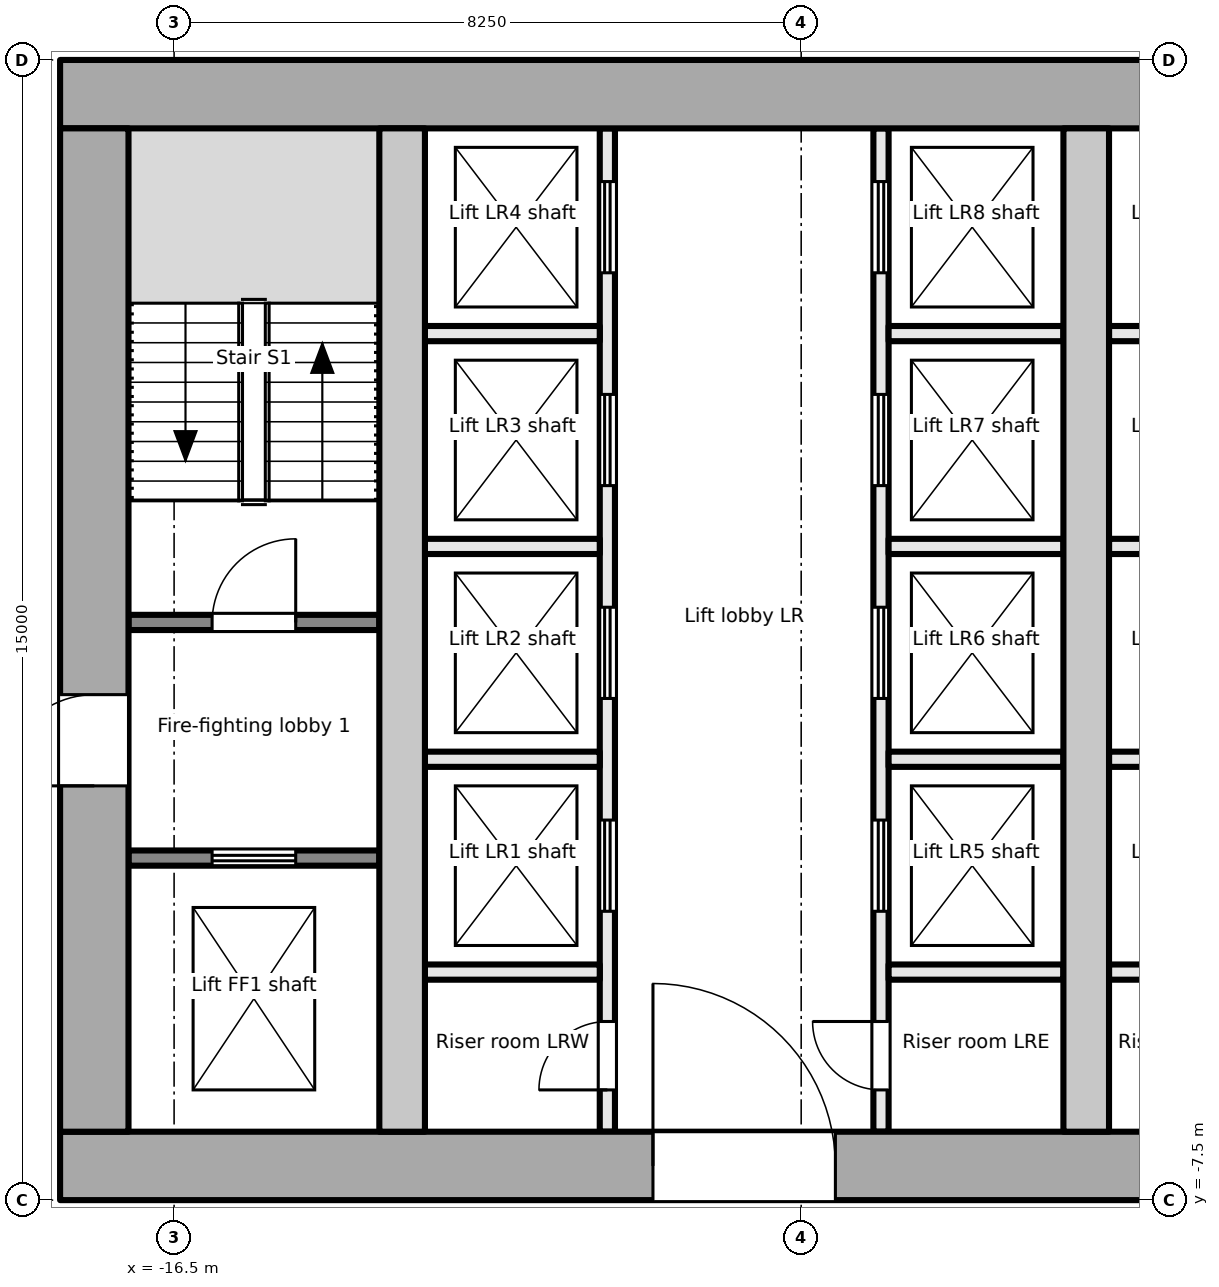
"""IFC4 building model, lengths in metres.
Left out: names, types, materials, properties, quantities, classifications, styles, units other than length and angle.
Written with IfcOpenShell. Run it as: python <this file> out.ifc"""

import sys

from ifc_helpers import new_model, si_unit, direction, frame, frame_2d, origin, place, context, subcontext, project, spatial, rectangle, extrude, element, fill, save


model = new_model("IFC4")
c1 = context("Model", 3, precision=1e-05, world=origin(), true_north=direction((0.0, 1.0)))
c2 = subcontext(c1, "Body", "Model", "MODEL_VIEW")
j1 = project(units=[si_unit("LENGTHUNIT", "METRE"), si_unit("PLANEANGLEUNIT", "RADIAN")], contexts=[c1])
p1 = place(None, origin())
s1 = spatial("IfcSite", under=j1, at=p1, CompositionType="ELEMENT")
p2 = place(p1, origin())
s2 = spatial("IfcBuilding", under=s1, at=p2, CompositionType="ELEMENT")
p3 = place(p2, frame((0.0, 0.0, 36.5)))
s3 = spatial("IfcBuildingStorey", under=s2, at=p3, CompositionType="ELEMENT", Elevation=36.5)
p4 = place(p3, frame((-18.0, -7.05, -0.2), z_axis=(0.0, 0.0, 1.0), x_axis=(1.0, 0.0, 0.0)))
e1 = element("IfcWall", 1, at=p4, inside=s3, PredefinedType="SHEAR", context=c2, shape_type="SweptSolid", body=[
    extrude(rectangle(XDim=36.0, YDim=0.9, at=frame_2d((18.0, 0.0))), origin(), (0.0, 0.0, 1.0), 4.1),
])
p5 = place(p4, frame((7.8, 0.0, 0.2)))
e2 = element("IfcOpeningElement", 2, at=p5, cuts=e1, PredefinedType="OPENING", context=c2, shape_type="SweptSolid", body=[
    extrude(rectangle(XDim=2.4, YDim=2.1, at=frame_2d((1.2, 1.05))), frame((0.0, 0.46, 0.0), z_axis=(0.0, -1.0, 0.0), x_axis=(1.0, 0.0, 0.0)), (0.0, 0.0, 1.0), 0.921),
])
p6 = place(p4, frame((17.4, 0.0, 0.2)))
e3 = element("IfcOpeningElement", 3, at=p6, cuts=e1, PredefinedType="OPENING", context=c2, shape_type="SweptSolid", body=[
    extrude(rectangle(XDim=1.2, YDim=2.1, at=frame_2d((0.6, 1.05))), frame((0.0, 0.46, 0.0), z_axis=(0.0, -1.0, 0.0), x_axis=(1.0, 0.0, 0.0)), (0.0, 0.0, 1.0), 0.921),
])
p7 = place(p4, frame((26.1, 0.0, 0.2)))
e4 = element("IfcOpeningElement", 4, at=p7, cuts=e1, PredefinedType="OPENING", context=c2, shape_type="SweptSolid", body=[
    extrude(rectangle(XDim=2.4, YDim=2.1, at=frame_2d((1.2, 1.05))), frame((0.0, 0.46, 0.0), z_axis=(0.0, -1.0, 0.0), x_axis=(1.0, 0.0, 0.0)), (0.0, 0.0, 1.0), 0.921),
])
p8 = place(p3, frame((-18.0, 7.05, -0.2), z_axis=(0.0, 0.0, 1.0), x_axis=(1.0, 0.0, 0.0)))
e5 = element("IfcWall", 5, at=p8, inside=s3, PredefinedType="SHEAR", context=c2, shape_type="SweptSolid", body=[
    extrude(rectangle(XDim=36.0, YDim=0.9, at=frame_2d((18.0, 0.0))), origin(), (0.0, 0.0, 1.0), 4.1),
])
p9 = place(p3, frame((-17.55, -6.6, -0.2), z_axis=(0.0, 0.0, 1.0), x_axis=(0.0, 1.0, 0.0)))
e6 = element("IfcWall", 6, at=p9, inside=s3, PredefinedType="SHEAR", context=c2, shape_type="SweptSolid", body=[
    extrude(rectangle(XDim=13.2, YDim=0.9, at=frame_2d((6.6, 0.0))), origin(), (0.0, 0.0, 1.0), 4.1),
])
p10 = place(p9, frame((4.55, 0.0, 0.2)))
e7 = element("IfcOpeningElement", 7, at=p10, cuts=e6, PredefinedType="OPENING", context=c2, shape_type="SweptSolid", body=[
    extrude(rectangle(XDim=1.2, YDim=2.1, at=frame_2d((0.6, 1.05))), frame((0.0, 0.46, 0.0), z_axis=(0.0, -1.0, 0.0), x_axis=(1.0, 0.0, 0.0)), (0.0, 0.0, 1.0), 0.921),
])
for number, where, z_axis, x_axis in (
    (8, (-13.5, -6.6, -0.2), (0.0, 0.0, 1.0), (0.0, 1.0, 0.0)),
    (9, (-4.5, -6.6, -0.2), (0.0, 0.0, 1.0), (0.0, 1.0, 0.0)),
):
    element("IfcWall", number, at=place(p3, frame(where, z_axis=z_axis, x_axis=x_axis)), inside=s3, PredefinedType="SHEAR", context=c2, shape_type="SweptSolid", body=[
        extrude(rectangle(XDim=13.2, YDim=0.6, at=frame_2d((6.6, 0.0))), origin(), (0.0, 0.0, 1.0), 4.1),
    ])
p11 = place(p3, frame((-17.1, -3.0, 0.0), z_axis=(0.0, 0.0, 1.0), x_axis=(1.0, 0.0, 0.0)))
e10 = element("IfcWall", 10, at=p11, inside=s3, PredefinedType="PARTITIONING", context=c2, shape_type="SweptSolid", body=[
    extrude(rectangle(XDim=3.3, YDim=0.2, at=frame_2d((1.65, 0.0))), origin(), (0.0, 0.0, 1.0), 3.9),
])
p12 = place(p11, frame((1.1, 0.0, 0.0)))
e11 = element("IfcOpeningElement", 11, at=p12, cuts=e10, PredefinedType="OPENING", context=c2, shape_type="SweptSolid", body=[
    extrude(rectangle(XDim=1.1, YDim=2.1, at=frame_2d((0.55, 1.05))), frame((0.0, 0.111, 0.0), z_axis=(0.0, -1.0, 0.0), x_axis=(1.0, 0.0, 0.0)), (0.0, 0.0, 1.0), 0.221),
])
p13 = place(p3, frame((-17.1, 0.1, 0.0), z_axis=(0.0, 0.0, 1.0), x_axis=(1.0, 0.0, 0.0)))
e12 = element("IfcWall", 12, at=p13, inside=s3, PredefinedType="PARTITIONING", context=c2, shape_type="SweptSolid", body=[
    extrude(rectangle(XDim=3.3, YDim=0.2, at=frame_2d((1.65, 0.0))), origin(), (0.0, 0.0, 1.0), 3.9),
])
p14 = place(p13, frame((1.1, 0.0, 0.0)))
e13 = element("IfcOpeningElement", 13, at=p14, cuts=e12, PredefinedType="OPENING", context=c2, shape_type="SweptSolid", body=[
    extrude(rectangle(XDim=1.1, YDim=2.1, at=frame_2d((0.55, 1.05))), frame((0.0, 0.111, 0.0), z_axis=(0.0, -1.0, 0.0), x_axis=(1.0, 0.0, 0.0)), (0.0, 0.0, 1.0), 0.221),
])
p15 = place(p3, frame((-10.8, -6.6, 0.0), z_axis=(0.0, 0.0, 1.0), x_axis=(0.0, 1.0, 0.0)))
e14 = element("IfcWall", 14, at=p15, inside=s3, PredefinedType="PARTITIONING", context=c2, shape_type="SweptSolid", body=[
    extrude(rectangle(XDim=13.2, YDim=0.2, at=frame_2d((6.6, 0.0))), origin(), (0.0, 0.0, 1.0), 3.9),
])
p16 = place(p15, frame((0.55, 0.0, 0.0)))
e15 = element("IfcOpeningElement", 15, at=p16, cuts=e14, PredefinedType="OPENING", context=c2, shape_type="SweptSolid", body=[
    extrude(rectangle(XDim=0.9, YDim=2.1, at=frame_2d((0.45, 1.05))), frame((0.0, 0.111, 0.0), z_axis=(0.0, -1.0, 0.0), x_axis=(1.0, 0.0, 0.0)), (0.0, 0.0, 1.0), 0.221),
])
p17 = place(p15, frame((2.9, 0.0, 0.0)))
e16 = element("IfcOpeningElement", 16, at=p17, cuts=e14, PredefinedType="OPENING", context=c2, shape_type="SweptSolid", body=[
    extrude(rectangle(XDim=1.2, YDim=2.1, at=frame_2d((0.6, 1.05))), frame((0.0, 0.111, 0.0), z_axis=(0.0, -1.0, 0.0), x_axis=(1.0, 0.0, 0.0)), (0.0, 0.0, 1.0), 0.221),
])
p18 = place(p15, frame((5.7, 0.0, 0.0)))
e17 = element("IfcOpeningElement", 17, at=p18, cuts=e14, PredefinedType="OPENING", context=c2, shape_type="SweptSolid", body=[
    extrude(rectangle(XDim=1.2, YDim=2.1, at=frame_2d((0.6, 1.05))), frame((0.0, 0.111, 0.0), z_axis=(0.0, -1.0, 0.0), x_axis=(1.0, 0.0, 0.0)), (0.0, 0.0, 1.0), 0.221),
])
p19 = place(p15, frame((8.5, 0.0, 0.0)))
e18 = element("IfcOpeningElement", 18, at=p19, cuts=e14, PredefinedType="OPENING", context=c2, shape_type="SweptSolid", body=[
    extrude(rectangle(XDim=1.2, YDim=2.1, at=frame_2d((0.6, 1.05))), frame((0.0, 0.111, 0.0), z_axis=(0.0, -1.0, 0.0), x_axis=(1.0, 0.0, 0.0)), (0.0, 0.0, 1.0), 0.221),
])
p20 = place(p15, frame((11.3, 0.0, 0.0)))
e19 = element("IfcOpeningElement", 19, at=p20, cuts=e14, PredefinedType="OPENING", context=c2, shape_type="SweptSolid", body=[
    extrude(rectangle(XDim=1.2, YDim=2.1, at=frame_2d((0.6, 1.05))), frame((0.0, 0.111, 0.0), z_axis=(0.0, -1.0, 0.0), x_axis=(1.0, 0.0, 0.0)), (0.0, 0.0, 1.0), 0.221),
])
p21 = place(p3, frame((-7.2, -6.6, 0.0), z_axis=(0.0, 0.0, 1.0), x_axis=(0.0, 1.0, 0.0)))
e20 = element("IfcWall", 20, at=p21, inside=s3, PredefinedType="PARTITIONING", context=c2, shape_type="SweptSolid", body=[
    extrude(rectangle(XDim=13.2, YDim=0.2, at=frame_2d((6.6, 0.0))), origin(), (0.0, 0.0, 1.0), 3.9),
])
p22 = place(p21, frame((0.55, 0.0, 0.0)))
e21 = element("IfcOpeningElement", 21, at=p22, cuts=e20, PredefinedType="OPENING", context=c2, shape_type="SweptSolid", body=[
    extrude(rectangle(XDim=0.9, YDim=2.1, at=frame_2d((0.45, 1.05))), frame((0.0, 0.111, 0.0), z_axis=(0.0, -1.0, 0.0), x_axis=(1.0, 0.0, 0.0)), (0.0, 0.0, 1.0), 0.221),
])
p23 = place(p21, frame((2.9, 0.0, 0.0)))
e22 = element("IfcOpeningElement", 22, at=p23, cuts=e20, PredefinedType="OPENING", context=c2, shape_type="SweptSolid", body=[
    extrude(rectangle(XDim=1.2, YDim=2.1, at=frame_2d((0.6, 1.05))), frame((0.0, 0.111, 0.0), z_axis=(0.0, -1.0, 0.0), x_axis=(1.0, 0.0, 0.0)), (0.0, 0.0, 1.0), 0.221),
])
p24 = place(p21, frame((5.7, 0.0, 0.0)))
e23 = element("IfcOpeningElement", 23, at=p24, cuts=e20, PredefinedType="OPENING", context=c2, shape_type="SweptSolid", body=[
    extrude(rectangle(XDim=1.2, YDim=2.1, at=frame_2d((0.6, 1.05))), frame((0.0, 0.111, 0.0), z_axis=(0.0, -1.0, 0.0), x_axis=(1.0, 0.0, 0.0)), (0.0, 0.0, 1.0), 0.221),
])
p25 = place(p21, frame((8.5, 0.0, 0.0)))
e24 = element("IfcOpeningElement", 24, at=p25, cuts=e20, PredefinedType="OPENING", context=c2, shape_type="SweptSolid", body=[
    extrude(rectangle(XDim=1.2, YDim=2.1, at=frame_2d((0.6, 1.05))), frame((0.0, 0.111, 0.0), z_axis=(0.0, -1.0, 0.0), x_axis=(1.0, 0.0, 0.0)), (0.0, 0.0, 1.0), 0.221),
])
p26 = place(p21, frame((11.3, 0.0, 0.0)))
e25 = element("IfcOpeningElement", 25, at=p26, cuts=e20, PredefinedType="OPENING", context=c2, shape_type="SweptSolid", body=[
    extrude(rectangle(XDim=1.2, YDim=2.1, at=frame_2d((0.6, 1.05))), frame((0.0, 0.111, 0.0), z_axis=(0.0, -1.0, 0.0), x_axis=(1.0, 0.0, 0.0)), (0.0, 0.0, 1.0), 0.221),
])
for number, where, z_axis, x_axis in (
    (26, (-13.2, -1.7, 0.0), (0.0, 0.0, 1.0), (1.0, 0.0, 0.0)),
    (27, (-13.2, 1.1, 0.0), (0.0, 0.0, 1.0), (1.0, 0.0, 0.0)),
    (28, (-13.2, 3.9, 0.0), (0.0, 0.0, 1.0), (1.0, 0.0, 0.0)),
    (29, (-13.2, -4.5, 0.0), (0.0, 0.0, 1.0), (1.0, 0.0, 0.0)),
    (30, (-7.1, -1.7, 0.0), (0.0, 0.0, 1.0), (1.0, 0.0, 0.0)),
    (31, (-7.1, 1.1, 0.0), (0.0, 0.0, 1.0), (1.0, 0.0, 0.0)),
    (32, (-7.1, 3.9, 0.0), (0.0, 0.0, 1.0), (1.0, 0.0, 0.0)),
    (33, (-7.1, -4.5, 0.0), (0.0, 0.0, 1.0), (1.0, 0.0, 0.0)),
    (34, (-4.2, -1.7, 0.0), (0.0, 0.0, 1.0), (1.0, 0.0, 0.0)),
    (35, (-4.2, 1.1, 0.0), (0.0, 0.0, 1.0), (1.0, 0.0, 0.0)),
    (36, (-4.2, 3.9, 0.0), (0.0, 0.0, 1.0), (1.0, 0.0, 0.0)),
    (37, (-4.2, -4.5, 0.0), (0.0, 0.0, 1.0), (1.0, 0.0, 0.0)),
):
    element("IfcWall", number, at=place(p3, frame(where, z_axis=z_axis, x_axis=x_axis)), inside=s3, PredefinedType="PARTITIONING", context=c2, shape_type="SweptSolid", body=[
        extrude(rectangle(XDim=2.3, YDim=0.2, at=frame_2d((1.15, 0.0))), origin(), (0.0, 0.0, 1.0), 3.9),
    ])
p27 = place(p12, origin())
e38 = element("IfcDoor", 38, at=p27, inside=s3, OperationType="DOUBLE_DOOR_SLIDING", PredefinedType="DOOR", context=c2, shape_type="SweptSolid", body=[
    extrude(rectangle(XDim=1.1, YDim=2.1, at=frame_2d((0.55, 1.05))), frame((0.0, 0.025, 0.0), z_axis=(0.0, -1.0, 0.0), x_axis=(1.0, 0.0, 0.0)), (0.0, 0.0, 1.0), 0.05),
])
fill(e11, e38)
p28 = place(p10, origin())
e39 = element("IfcDoor", 39, at=p28, inside=s3, OperationType="SINGLE_SWING_LEFT", PredefinedType="DOOR", context=c2, shape_type="SweptSolid", body=[
    extrude(rectangle(XDim=1.2, YDim=2.1, at=frame_2d((0.6, 1.05))), frame((0.0, 0.025, 0.0), z_axis=(0.0, -1.0, 0.0), x_axis=(1.0, 0.0, 0.0)), (0.0, 0.0, 1.0), 0.05),
])
fill(e7, e39)
p29 = place(p14, origin())
e40 = element("IfcDoor", 40, at=p29, inside=s3, OperationType="SINGLE_SWING_RIGHT", PredefinedType="DOOR", context=c2, shape_type="SweptSolid", body=[
    extrude(rectangle(XDim=1.1, YDim=2.1, at=frame_2d((0.55, 1.05))), frame((0.0, 0.025, 0.0), z_axis=(0.0, -1.0, 0.0), x_axis=(1.0, 0.0, 0.0)), (0.0, 0.0, 1.0), 0.05),
])
fill(e13, e40)
p30 = place(p16, origin())
e41 = element("IfcDoor", 41, at=p30, inside=s3, OperationType="SINGLE_SWING_LEFT", PredefinedType="DOOR", context=c2, shape_type="SweptSolid", body=[
    extrude(rectangle(XDim=0.9, YDim=2.1, at=frame_2d((0.45, 1.05))), frame((0.0, 0.025, 0.0), z_axis=(0.0, -1.0, 0.0), x_axis=(1.0, 0.0, 0.0)), (0.0, 0.0, 1.0), 0.05),
])
fill(e15, e41)
p31 = place(p17, origin())
e42 = element("IfcDoor", 42, at=p31, inside=s3, OperationType="DOUBLE_DOOR_SLIDING", PredefinedType="DOOR", context=c2, shape_type="SweptSolid", body=[
    extrude(rectangle(XDim=1.2, YDim=2.1, at=frame_2d((0.6, 1.05))), frame((0.0, 0.025, 0.0), z_axis=(0.0, -1.0, 0.0), x_axis=(1.0, 0.0, 0.0)), (0.0, 0.0, 1.0), 0.05),
])
fill(e16, e42)
p32 = place(p18, origin())
e43 = element("IfcDoor", 43, at=p32, inside=s3, OperationType="DOUBLE_DOOR_SLIDING", PredefinedType="DOOR", context=c2, shape_type="SweptSolid", body=[
    extrude(rectangle(XDim=1.2, YDim=2.1, at=frame_2d((0.6, 1.05))), frame((0.0, 0.025, 0.0), z_axis=(0.0, -1.0, 0.0), x_axis=(1.0, 0.0, 0.0)), (0.0, 0.0, 1.0), 0.05),
])
fill(e17, e43)
p33 = place(p19, origin())
e44 = element("IfcDoor", 44, at=p33, inside=s3, OperationType="DOUBLE_DOOR_SLIDING", PredefinedType="DOOR", context=c2, shape_type="SweptSolid", body=[
    extrude(rectangle(XDim=1.2, YDim=2.1, at=frame_2d((0.6, 1.05))), frame((0.0, 0.025, 0.0), z_axis=(0.0, -1.0, 0.0), x_axis=(1.0, 0.0, 0.0)), (0.0, 0.0, 1.0), 0.05),
])
fill(e18, e44)
p34 = place(p20, origin())
e45 = element("IfcDoor", 45, at=p34, inside=s3, OperationType="DOUBLE_DOOR_SLIDING", PredefinedType="DOOR", context=c2, shape_type="SweptSolid", body=[
    extrude(rectangle(XDim=1.2, YDim=2.1, at=frame_2d((0.6, 1.05))), frame((0.0, 0.025, 0.0), z_axis=(0.0, -1.0, 0.0), x_axis=(1.0, 0.0, 0.0)), (0.0, 0.0, 1.0), 0.05),
])
fill(e19, e45)
p35 = place(p22, origin())
e46 = element("IfcDoor", 46, at=p35, inside=s3, OperationType="SINGLE_SWING_RIGHT", PredefinedType="DOOR", context=c2, shape_type="SweptSolid", body=[
    extrude(rectangle(XDim=0.9, YDim=2.1, at=frame_2d((0.45, 1.05))), frame((0.0, 0.025, 0.0), z_axis=(0.0, -1.0, 0.0), x_axis=(1.0, 0.0, 0.0)), (0.0, 0.0, 1.0), 0.05),
])
fill(e21, e46)
p36 = place(p23, origin())
e47 = element("IfcDoor", 47, at=p36, inside=s3, OperationType="DOUBLE_DOOR_SLIDING", PredefinedType="DOOR", context=c2, shape_type="SweptSolid", body=[
    extrude(rectangle(XDim=1.2, YDim=2.1, at=frame_2d((0.6, 1.05))), frame((0.0, 0.025, 0.0), z_axis=(0.0, -1.0, 0.0), x_axis=(1.0, 0.0, 0.0)), (0.0, 0.0, 1.0), 0.05),
])
fill(e22, e47)
p37 = place(p24, origin())
e48 = element("IfcDoor", 48, at=p37, inside=s3, OperationType="DOUBLE_DOOR_SLIDING", PredefinedType="DOOR", context=c2, shape_type="SweptSolid", body=[
    extrude(rectangle(XDim=1.2, YDim=2.1, at=frame_2d((0.6, 1.05))), frame((0.0, 0.025, 0.0), z_axis=(0.0, -1.0, 0.0), x_axis=(1.0, 0.0, 0.0)), (0.0, 0.0, 1.0), 0.05),
])
fill(e23, e48)
p38 = place(p25, origin())
e49 = element("IfcDoor", 49, at=p38, inside=s3, OperationType="DOUBLE_DOOR_SLIDING", PredefinedType="DOOR", context=c2, shape_type="SweptSolid", body=[
    extrude(rectangle(XDim=1.2, YDim=2.1, at=frame_2d((0.6, 1.05))), frame((0.0, 0.025, 0.0), z_axis=(0.0, -1.0, 0.0), x_axis=(1.0, 0.0, 0.0)), (0.0, 0.0, 1.0), 0.05),
])
fill(e24, e49)
p39 = place(p26, origin())
e50 = element("IfcDoor", 50, at=p39, inside=s3, OperationType="DOUBLE_DOOR_SLIDING", PredefinedType="DOOR", context=c2, shape_type="SweptSolid", body=[
    extrude(rectangle(XDim=1.2, YDim=2.1, at=frame_2d((0.6, 1.05))), frame((0.0, 0.025, 0.0), z_axis=(0.0, -1.0, 0.0), x_axis=(1.0, 0.0, 0.0)), (0.0, 0.0, 1.0), 0.05),
])
fill(e25, e50)
p40 = place(p5, origin())
e51 = element("IfcDoor", 51, at=p40, inside=s3, OperationType="DOUBLE_DOOR_DOUBLE_SWING", PredefinedType="DOOR", context=c2, shape_type="SweptSolid", body=[
    extrude(rectangle(XDim=2.4, YDim=2.1, at=frame_2d((1.2, 1.05))), frame((0.0, 0.025, 0.0), z_axis=(0.0, -1.0, 0.0), x_axis=(1.0, 0.0, 0.0)), (0.0, 0.0, 1.0), 0.05),
])
fill(e2, e51)
save(model, sys.argv[1])
